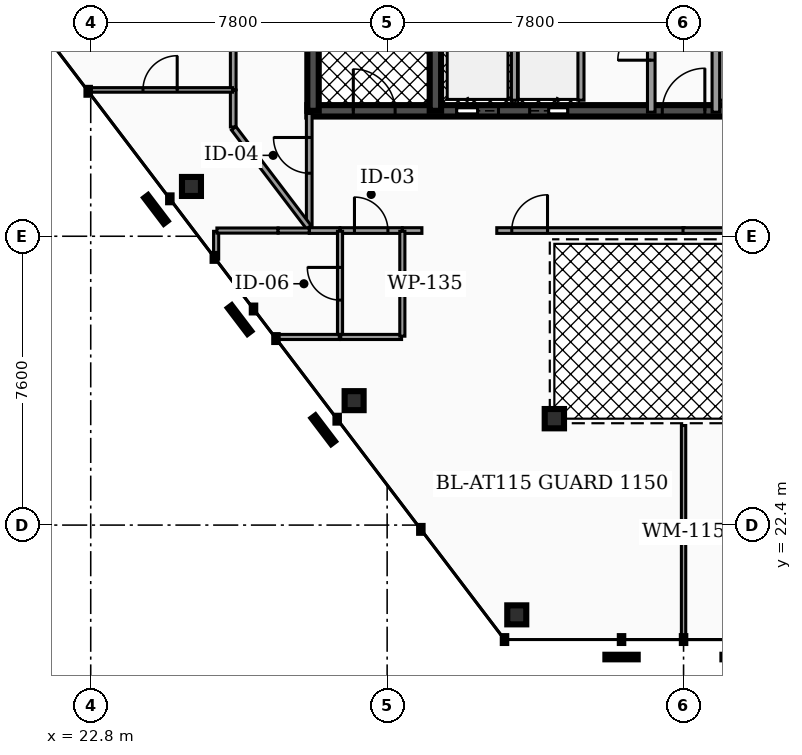
"""IFC4 building model, lengths in metres.
Left out: names, types, materials, properties, quantities, classifications, styles, units other than length and angle.
Written with IfcOpenShell. Run it as: python <this file> out.ifc"""

import sys

from ifc_helpers import new_model, si_unit, direction, frame, frame_2d, origin, origin_2d, place, context, subcontext, project, spatial, rectangle, hollow_rectangle, hollow_circle, extrude, element, fill, save


model = new_model("IFC4")
c1 = context("Model", 3, precision=1e-05, world=origin(), true_north=direction((0.0, 1.0)))
c2 = subcontext(c1, "Body", "Model", "MODEL_VIEW")
j1 = project(units=[si_unit("LENGTHUNIT", "METRE"), si_unit("PLANEANGLEUNIT", "RADIAN")], contexts=[c1])
p1 = place(None, origin())
s1 = spatial("IfcSite", under=j1, at=p1, CompositionType="ELEMENT")
p2 = place(p1, origin())
s2 = spatial("IfcBuilding", under=s1, at=p2, CompositionType="ELEMENT")
p3 = place(p2, frame((0.0, 0.0, 275.4)))
s3 = spatial("IfcBuildingStorey", under=s2, at=p3, CompositionType="ELEMENT", Elevation=275.4)
p4 = place(p3, frame((28.5, 33.3, 0.0), z_axis=(0.0, 0.0, 1.0), x_axis=(1.0, 0.0, 0.0)))
e1 = element("IfcWall", 1, at=p4, inside=s3, PredefinedType="SHEAR", context=c2, shape_type="SweptSolid", body=[
    extrude(rectangle(XDim=19.86, YDim=0.3, at=frame_2d((9.93, 0.0))), origin(), (0.0, 0.0, 1.0), 3.18),
])
p5 = place(p4, frame((3.93, 0.0, 0.0)))
e2 = element("IfcOpeningElement", 2, at=p5, cuts=e1, PredefinedType="OPENING", context=c2, shape_type="SweptSolid", body=[
    extrude(rectangle(XDim=1.1, YDim=2.15, at=frame_2d((0.55, 1.075))), frame((0.0, 0.16, 0.0), z_axis=(0.0, -1.0, 0.0), x_axis=(1.0, 0.0, 0.0)), (0.0, 0.0, 1.0), 0.32),
])
p6 = place(p4, frame((14.77, 0.0, 0.0)))
e3 = element("IfcOpeningElement", 3, at=p6, cuts=e1, PredefinedType="OPENING", context=c2, shape_type="SweptSolid", body=[
    extrude(rectangle(XDim=1.1, YDim=2.15, at=frame_2d((0.55, 1.075))), frame((0.0, 0.16, 0.0), z_axis=(0.0, -1.0, 0.0), x_axis=(1.0, 0.0, 0.0)), (0.0, 0.0, 1.0), 0.32),
])
p7 = place(p4, frame((11.25, 0.0, 0.0)))
e4 = element("IfcOpeningElement", 4, at=p7, cuts=e1, PredefinedType="OPENING", context=c2, shape_type="SweptSolid", body=[
    extrude(rectangle(XDim=1.0, YDim=2.1, at=frame_2d((0.5, 1.05))), frame((0.0, 0.16, 0.0), z_axis=(0.0, -1.0, 0.0), x_axis=(1.0, 0.0, 0.0)), (0.0, 0.0, 1.0), 0.32),
])
p8 = place(p4, frame((12.95, 0.0, 0.0)))
e5 = element("IfcOpeningElement", 5, at=p8, cuts=e1, PredefinedType="OPENING", context=c2, shape_type="SweptSolid", body=[
    extrude(rectangle(XDim=1.0, YDim=2.1, at=frame_2d((0.5, 1.05))), frame((0.0, 0.16, 0.0), z_axis=(0.0, -1.0, 0.0), x_axis=(1.0, 0.0, 0.0)), (0.0, 0.0, 1.0), 0.32),
])
p9 = place(p4, frame((5.85, 0.0, 0.0)))
e6 = element("IfcOpeningElement", 6, at=p9, cuts=e1, PredefinedType="OPENING", context=c2, shape_type="SweptSolid", body=[
    extrude(rectangle(XDim=1.0, YDim=2.1, at=frame_2d((0.5, 1.05))), frame((0.0, 0.16, 0.0), z_axis=(0.0, -1.0, 0.0), x_axis=(1.0, 0.0, 0.0)), (0.0, 0.0, 1.0), 0.32),
])
p10 = place(p4, frame((1.21, 0.0, 0.0)))
e7 = element("IfcOpeningElement", 7, at=p10, cuts=e1, PredefinedType="OPENING", context=c2, shape_type="SweptSolid", body=[
    extrude(rectangle(XDim=1.1, YDim=2.2, at=frame_2d((0.55, 1.1))), frame((0.0, 0.16, 0.0), z_axis=(0.0, -1.0, 0.0), x_axis=(1.0, 0.0, 0.0)), (0.0, 0.0, 1.0), 0.32),
])
p11 = place(p4, frame((9.34, 0.0, 0.0)))
e8 = element("IfcOpeningElement", 8, at=p11, cuts=e1, PredefinedType="OPENING", context=c2, shape_type="SweptSolid", body=[
    extrude(rectangle(XDim=1.12, YDim=2.05, at=frame_2d((0.56, 1.025))), frame((0.0, 0.16, 0.0), z_axis=(0.0, -1.0, 0.0), x_axis=(1.0, 0.0, 0.0)), (0.0, 0.0, 1.0), 0.32),
])
p12 = place(p4, frame((17.55, 0.0, 0.0)))
e9 = element("IfcOpeningElement", 9, at=p12, cuts=e1, PredefinedType="OPENING", context=c2, shape_type="SweptSolid", body=[
    extrude(rectangle(XDim=1.1, YDim=2.2, at=frame_2d((0.55, 1.1))), frame((0.0, 0.16, 0.0), z_axis=(0.0, -1.0, 0.0), x_axis=(1.0, 0.0, 0.0)), (0.0, 0.0, 1.0), 0.32),
])
for number, where, z_axis, x_axis in (
    (10, (28.65, 33.3, 0.0), (0.0, 0.0, 1.0), (0.0, 1.0, 0.0)),
    (11, (31.87, 33.3, 0.0), (0.0, 0.0, 1.0), (0.0, 1.0, 0.0)),
):
    element("IfcWall", number, at=place(p3, frame(where, z_axis=z_axis, x_axis=x_axis)), inside=s3, PredefinedType="SHEAR", context=c2, shape_type="SweptSolid", body=[
        extrude(rectangle(XDim=10.1, YDim=0.3, at=frame_2d((5.05, 0.0))), origin(), (0.0, 0.0, 1.0), 3.18),
    ])
p13 = place(p3, frame((25.451, 31.31, 0.0), z_axis=(0.06991126496, 0.123712542777, 0.989852323224), x_axis=(-0.870602675334, 0.491986769845, 0.0)))
e12 = element("IfcColumn", 12, at=p13, inside=s3, PredefinedType="COLUMN", context=c2, shape_type="SweptSolid", body=[
    extrude(hollow_rectangle(XDim=0.5, YDim=0.5, WallThickness=0.025, at=origin_2d()), origin(), (0.0, 0.0, 1.0), 3.213),
])
p14 = place(p3, frame((29.731, 25.674, 0.0), z_axis=(0.069335984522, 0.128875318438, 0.989233882127), x_axis=(-0.880637676987, 0.47379033535, 0.0)))
e13 = element("IfcColumn", 13, at=p14, inside=s3, PredefinedType="COLUMN", context=c2, shape_type="SweptSolid", body=[
    extrude(hollow_rectangle(XDim=0.5, YDim=0.5, WallThickness=0.025, at=origin_2d()), origin(), (0.0, 0.0, 1.0), 3.215),
])
p15 = place(p3, frame((34.011, 20.038, 0.0), z_axis=(0.068684707396, 0.133954153098, 0.988604418277), x_axis=(-0.889843706044, 0.456265469671, 0.0)))
e14 = element("IfcColumn", 14, at=p15, inside=s3, PredefinedType="COLUMN", context=c2, shape_type="SweptSolid", body=[
    extrude(hollow_rectangle(XDim=0.5, YDim=0.5, WallThickness=0.025, at=origin_2d()), origin(), (0.0, 0.0, 1.0), 3.217),
])
p16 = place(p3, frame((35.0, 25.2, 0.0), z_axis=(0.0, 0.0, 1.0), x_axis=(1.0, 0.0, 0.0)))
e15 = element("IfcColumn", 15, at=p16, inside=s3, PredefinedType="COLUMN", context=c2, shape_type="SweptSolid", body=[
    extrude(hollow_circle(Radius=0.254, WallThickness=0.02, at=origin_2d()), origin(), (0.0, 0.0, 1.0), 3.18),
])
p17 = place(p3, frame((33.95, 33.58, 0.0), z_axis=(0.0, 0.0, 1.0), x_axis=(0.0, 1.0, 0.0)))
e16 = element("IfcWall", 16, at=p17, inside=s3, PredefinedType="SOLIDWALL", context=c2, shape_type="SweptSolid", body=[
    extrude(rectangle(XDim=2.45, YDim=0.16, at=frame_2d((1.225, 0.0))), origin(), (0.0, 0.0, 1.0), 3.18),
])
for number, where, z_axis, x_axis in (
    (17, (39.4, 33.58, 0.0), (0.0, 0.0, 1.0), (0.0, 1.0, 0.0)),
    (18, (35.7, 33.58, 0.0), (0.0, 0.0, 1.0), (0.0, 1.0, 0.0)),
):
    element("IfcWall", number, at=place(p3, frame(where, z_axis=z_axis, x_axis=x_axis)), inside=s3, PredefinedType="SOLIDWALL", context=c2, shape_type="SweptSolid", body=[
        extrude(rectangle(XDim=2.25, YDim=0.16, at=frame_2d((1.125, 0.0))), origin(), (0.0, 0.0, 1.0), 3.18),
    ])
p18 = place(p3, frame((37.55, 33.265, 0.0), z_axis=(0.0, 0.0, 1.0), x_axis=(0.0, 1.0, 0.0)))
e19 = element("IfcWall", 19, at=p18, inside=s3, PredefinedType="PARTITIONING", context=c2, shape_type="SweptSolid", body=[
    extrude(rectangle(XDim=3.615, YDim=0.2, at=frame_2d((1.808, 0.0))), origin(), (0.0, 0.0, 1.0), 2.235),
])
p19 = place(p18, frame((1.367, 0.0, 0.0)))
e20 = element("IfcOpeningElement", 20, at=p19, cuts=e19, PredefinedType="OPENING", context=c2, shape_type="SweptSolid", body=[
    extrude(rectangle(XDim=0.88, YDim=2.05, at=frame_2d((0.44, 1.025))), frame((0.0, 0.11, 0.0), z_axis=(0.0, -1.0, 0.0), x_axis=(1.0, 0.0, 0.0)), (0.0, 0.0, 1.0), 0.22),
])
p20 = place(p3, frame((39.25, 33.265, 0.0), z_axis=(0.0, 0.0, 1.0), x_axis=(0.0, 1.0, 0.0)))
e21 = element("IfcWall", 21, at=p20, inside=s3, PredefinedType="PARTITIONING", context=c2, shape_type="SweptSolid", body=[
    extrude(rectangle(XDim=3.615, YDim=0.2, at=frame_2d((1.808, 0.0))), origin(), (0.0, 0.0, 1.0), 2.235),
])
p21 = place(p3, frame((28.55, 30.227, 0.0), z_axis=(0.0, 0.0, 1.0), x_axis=(0.0, 1.0, 0.0)))
e22 = element("IfcWall", 22, at=p21, inside=s3, PredefinedType="PARTITIONING", context=c2, shape_type="SweptSolid", body=[
    extrude(rectangle(XDim=3.003, YDim=0.15, at=frame_2d((1.501, 0.0))), origin(), (0.0, 0.0, 1.0), 2.235),
])
p22 = place(p21, frame((1.431, 0.0, 0.0)))
e23 = element("IfcOpeningElement", 23, at=p22, cuts=e22, PredefinedType="OPENING", context=c2, shape_type="SweptSolid", body=[
    extrude(rectangle(XDim=0.94, YDim=2.05, at=frame_2d((0.47, 1.025))), frame((0.0, 0.085, 0.0), z_axis=(0.0, -1.0, 0.0), x_axis=(1.0, 0.0, 0.0)), (0.0, 0.0, 1.0), 0.17),
])
p23 = place(p3, frame((29.365, 30.15, 0.0), z_axis=(0.0, 0.0, 1.0), x_axis=(1.0, 0.0, 0.0)))
e24 = element("IfcWall", 24, at=p23, inside=s3, PredefinedType="PARTITIONING", context=c2, shape_type="SweptSolid", body=[
    extrude(rectangle(XDim=1.63, YDim=0.15, at=frame_2d((0.815, 0.0))), origin(), (0.0, 0.0, 1.0), 2.235),
])
p24 = place(p23, frame((0.375, 0.0, 0.0)))
e25 = element("IfcOpeningElement", 25, at=p24, cuts=e24, PredefinedType="OPENING", context=c2, shape_type="SweptSolid", body=[
    extrude(rectangle(XDim=0.88, YDim=2.05, at=frame_2d((0.44, 1.025))), frame((0.0, 0.085, 0.0), z_axis=(0.0, -1.0, 0.0), x_axis=(1.0, 0.0, 0.0)), (0.0, 0.0, 1.0), 0.17),
])
p25 = place(p3, frame((28.55, 30.15, 0.0), z_axis=(0.0, 0.0, 1.0), x_axis=(1.0, 0.0, 0.0)))
e26 = element("IfcWall", 26, at=p25, inside=s3, PredefinedType="PARTITIONING", context=c2, shape_type="SweptSolid", body=[
    extrude(rectangle(XDim=0.805, YDim=0.15, at=frame_2d((0.402, 0.0))), origin(), (0.0, 0.0, 1.0), 2.235),
])
p26 = place(p3, frame((33.485, 30.15, 0.0), z_axis=(0.0, 0.0, 1.0), x_axis=(1.0, 0.0, 0.0)))
e27 = element("IfcWall", 27, at=p26, inside=s3, PredefinedType="PARTITIONING", context=c2, shape_type="SweptSolid", body=[
    extrude(rectangle(XDim=4.93, YDim=0.15, at=frame_2d((2.465, 0.0))), origin(), (0.0, 0.0, 1.0), 2.235),
])
p27 = place(p26, frame((0.395, 0.0, 0.0)))
e28 = element("IfcOpeningElement", 28, at=p27, cuts=e27, PredefinedType="OPENING", context=c2, shape_type="SweptSolid", body=[
    extrude(rectangle(XDim=0.94, YDim=2.05, at=frame_2d((0.47, 1.025))), frame((0.0, 0.085, 0.0), z_axis=(0.0, -1.0, 0.0), x_axis=(1.0, 0.0, 0.0)), (0.0, 0.0, 1.0), 0.17),
])
p28 = place(p3, frame((31.005, 30.15, 0.0), z_axis=(0.0, 0.0, 1.0), x_axis=(1.0, 0.0, 0.0)))
e29 = element("IfcWall", 29, at=p28, inside=s3, PredefinedType="PARTITIONING", context=c2, shape_type="SweptSolid", body=[
    extrude(rectangle(XDim=0.51, YDim=0.15, at=frame_2d((0.255, 0.0))), origin(), (0.0, 0.0, 1.0), 2.235),
])
p29 = place(p3, frame((38.385, 30.15, 0.0), z_axis=(0.0, 0.0, 1.0), x_axis=(1.0, 0.0, 0.0)))
e30 = element("IfcWall", 30, at=p29, inside=s3, PredefinedType="PARTITIONING", context=c2, shape_type="SweptSolid", body=[
    extrude(rectangle(XDim=4.93, YDim=0.15, at=frame_2d((2.465, 0.0))), origin(), (0.0, 0.0, 1.0), 2.235),
])
p30 = place(p29, frame((3.595, 0.0, 0.0)))
e31 = element("IfcOpeningElement", 31, at=p30, cuts=e30, PredefinedType="OPENING", context=c2, shape_type="SweptSolid", body=[
    extrude(rectangle(XDim=0.94, YDim=2.05, at=frame_2d((0.47, 1.025))), frame((0.0, 0.085, 0.0), z_axis=(0.0, -1.0, 0.0), x_axis=(1.0, 0.0, 0.0)), (0.0, 0.0, 1.0), 0.17),
])
p31 = place(p3, frame((26.55, 33.855, 0.0), z_axis=(0.0, 0.0, 1.0), x_axis=(0.0, 1.0, 0.0)))
e32 = element("IfcWall", 32, at=p31, inside=s3, PredefinedType="PARTITIONING", context=c2, shape_type="SweptSolid", body=[
    extrude(rectangle(XDim=9.695, YDim=0.15, at=frame_2d((4.847, 0.0))), origin(), (0.0, 0.0, 1.0), 2.235),
])
p32 = place(p31, frame((4.377, 0.0, 0.0)))
e33 = element("IfcOpeningElement", 33, at=p32, cuts=e32, PredefinedType="OPENING", context=c2, shape_type="SweptSolid", body=[
    extrude(rectangle(XDim=0.94, YDim=2.05, at=frame_2d((0.47, 1.025))), frame((0.0, 0.085, 0.0), z_axis=(0.0, -1.0, 0.0), x_axis=(1.0, 0.0, 0.0)), (0.0, 0.0, 1.0), 0.17),
])
p33 = place(p3, frame((26.562, 32.84, 0.0), z_axis=(0.0, 0.0, 1.0), x_axis=(0.604783852999, -0.796389660375, 0.0)))
e34 = element("IfcWall", 34, at=p33, inside=s3, PredefinedType="PARTITIONING", context=c2, shape_type="SweptSolid", body=[
    extrude(rectangle(XDim=3.267, YDim=0.15, at=frame_2d((1.634, 0.0))), origin(), (0.0, 0.0, 1.0), 2.235),
])
p34 = place(p3, frame((26.55, 32.875, 0.0), z_axis=(0.0, 0.0, 1.0), x_axis=(0.0, 1.0, 0.0)))
e35 = element("IfcWall", 35, at=p34, inside=s3, PredefinedType="PARTITIONING", context=c2, shape_type="SweptSolid", body=[
    extrude(rectangle(XDim=0.97, YDim=0.15, at=frame_2d((0.485, 0.0))), origin(), (0.0, 0.0, 1.0), 2.235),
])
p35 = place(p3, frame((29.36, 27.37, 0.0), z_axis=(0.0, 0.0, 1.0), x_axis=(0.0, 1.0, 0.0)))
e36 = element("IfcWall", 36, at=p35, inside=s3, PredefinedType="PARTITIONING", context=c2, shape_type="SweptSolid", body=[
    extrude(rectangle(XDim=2.76, YDim=0.135, at=frame_2d((1.38, 0.0))), origin(), (0.0, 0.0, 1.0), 2.235),
])
p36 = place(p35, frame((0.95, 0.0, 0.0)))
e37 = element("IfcOpeningElement", 37, at=p36, cuts=e36, PredefinedType="OPENING", context=c2, shape_type="SweptSolid", body=[
    extrude(rectangle(XDim=0.86, YDim=2.05, at=frame_2d((0.43, 1.025))), frame((0.0, 0.077, 0.0), z_axis=(0.0, -1.0, 0.0), x_axis=(1.0, 0.0, 0.0)), (0.0, 0.0, 1.0), 0.155),
])
p37 = place(p3, frame((29.38, 27.35, 0.0), z_axis=(0.0, 0.0, 1.0), x_axis=(1.0, 0.0, 0.0)))
e38 = element("IfcWall", 38, at=p37, inside=s3, PredefinedType="PARTITIONING", context=c2, shape_type="SweptSolid", body=[
    extrude(rectangle(XDim=1.6, YDim=0.135, at=frame_2d((0.8, 0.0))), origin(), (0.0, 0.0, 1.0), 2.235),
])
p38 = place(p3, frame((31.0, 27.37, 0.0), z_axis=(0.0, 0.0, 1.0), x_axis=(0.0, 1.0, 0.0)))
e39 = element("IfcWall", 39, at=p38, inside=s3, PredefinedType="PARTITIONING", context=c2, shape_type="SweptSolid", body=[
    extrude(rectangle(XDim=2.76, YDim=0.135, at=frame_2d((1.38, 0.0))), origin(), (0.0, 0.0, 1.0), 2.235),
])
p39 = place(p3, frame((27.657, 27.35, 0.0), z_axis=(0.0, 0.0, 1.0), x_axis=(1.0, 0.0, 0.0)))
e40 = element("IfcWall", 40, at=p39, inside=s3, PredefinedType="PARTITIONING", context=c2, shape_type="SweptSolid", body=[
    extrude(rectangle(XDim=1.683, YDim=0.135, at=frame_2d((0.842, 0.0))), origin(), (0.0, 0.0, 1.0), 2.235),
])
p40 = place(p3, frame((26.1, 29.396, 0.0), z_axis=(0.0, 0.0, 1.0), x_axis=(0.0, 1.0, 0.0)))
e41 = element("IfcWall", 41, at=p40, inside=s3, PredefinedType="PARTITIONING", context=c2, shape_type="SweptSolid", body=[
    extrude(rectangle(XDim=0.734, YDim=0.135, at=frame_2d((0.367, 0.0))), origin(), (0.0, 0.0, 1.0), 2.235),
])
p41 = place(p3, frame((26.12, 30.15, 0.0), z_axis=(0.0, 0.0, 1.0), x_axis=(1.0, 0.0, 0.0)))
e42 = element("IfcWall", 42, at=p41, inside=s3, PredefinedType="PARTITIONING", context=c2, shape_type="SweptSolid", body=[
    extrude(rectangle(XDim=1.61, YDim=0.135, at=frame_2d((0.805, 0.0))), origin(), (0.0, 0.0, 1.0), 2.235),
])
p42 = place(p3, frame((27.73, 30.15, 0.0), z_axis=(0.0, 0.0, 1.0), x_axis=(1.0, 0.0, 0.0)))
e43 = element("IfcWall", 43, at=p42, inside=s3, PredefinedType="PARTITIONING", context=c2, shape_type="SweptSolid", body=[
    extrude(rectangle(XDim=0.82, YDim=0.135, at=frame_2d((0.41, 0.0))), origin(), (0.0, 0.0, 1.0), 2.235),
])
p43 = place(p3, frame((38.4, 19.403, 0.0), z_axis=(0.0, 0.0, 1.0), x_axis=(0.0, 1.0, 0.0)))
e44 = element("IfcWall", 44, at=p43, inside=s3, PredefinedType="MOVABLE", context=c2, shape_type="SweptSolid", body=[
    extrude(rectangle(XDim=5.617, YDim=0.115, at=frame_2d((2.809, 0.0))), origin(), (0.0, 0.0, 1.0), 2.235),
])
p44 = place(p3, frame((22.721, 33.85, 0.0), z_axis=(0.0, 0.0, 1.0), x_axis=(1.0, 0.0, 0.0)))
e45 = element("IfcWall", 45, at=p44, inside=s3, PredefinedType="PARTITIONING", context=c2, shape_type="SweptSolid", body=[
    extrude(rectangle(XDim=3.809, YDim=0.12, at=frame_2d((1.905, 0.0))), origin(), (0.0, 0.0, 1.0), 2.235),
])
p45 = place(p44, frame((1.455, 0.0, 0.0)))
e46 = element("IfcOpeningElement", 46, at=p45, cuts=e45, PredefinedType="OPENING", context=c2, shape_type="SweptSolid", body=[
    extrude(rectangle(XDim=0.9, YDim=2.05, at=frame_2d((0.45, 1.025))), frame((0.0, 0.07, 0.0), z_axis=(0.0, -1.0, 0.0), x_axis=(1.0, 0.0, 0.0)), (0.0, 0.0, 1.0), 0.14),
])
p46 = place(p5, origin())
e47 = element("IfcDoor", 47, at=p46, inside=s3, OperationType="SLIDING_TO_LEFT", PredefinedType="DOOR", context=c2, shape_type="SweptSolid", body=[
    extrude(rectangle(XDim=1.1, YDim=2.15, at=frame_2d((0.55, 1.075))), frame((0.0, 0.025, 0.0), z_axis=(0.0, -1.0, 0.0), x_axis=(1.0, 0.0, 0.0)), (0.0, 0.0, 1.0), 0.05),
])
fill(e2, e47)
p47 = place(p9, origin())
e48 = element("IfcDoor", 48, at=p47, inside=s3, OperationType="SLIDING_TO_RIGHT", PredefinedType="DOOR", context=c2, shape_type="SweptSolid", body=[
    extrude(rectangle(XDim=1.0, YDim=2.1, at=frame_2d((0.5, 1.05))), frame((0.0, 0.025, 0.0), z_axis=(0.0, -1.0, 0.0), x_axis=(1.0, 0.0, 0.0)), (0.0, 0.0, 1.0), 0.05),
])
fill(e6, e48)
p48 = place(p10, origin())
e49 = element("IfcDoor", 49, at=p48, inside=s3, OperationType="SINGLE_SWING_LEFT", PredefinedType="DOOR", context=c2, shape_type="SweptSolid", body=[
    extrude(rectangle(XDim=1.1, YDim=2.2, at=frame_2d((0.55, 1.1))), frame((0.0, 0.025, 0.0), z_axis=(0.0, -1.0, 0.0), x_axis=(1.0, 0.0, 0.0)), (0.0, 0.0, 1.0), 0.05),
])
fill(e7, e49)
p49 = place(p11, origin())
e50 = element("IfcDoor", 50, at=p49, inside=s3, OperationType="SINGLE_SWING_RIGHT", PredefinedType="DOOR", context=c2, shape_type="SweptSolid", body=[
    extrude(rectangle(XDim=1.12, YDim=2.05, at=frame_2d((0.56, 1.025))), frame((0.0, 0.025, 0.0), z_axis=(0.0, -1.0, 0.0), x_axis=(1.0, 0.0, 0.0)), (0.0, 0.0, 1.0), 0.05),
])
fill(e8, e50)
p50 = place(p19, origin())
e51 = element("IfcDoor", 51, at=p50, inside=s3, OperationType="SINGLE_SWING_LEFT", PredefinedType="DOOR", context=c2, shape_type="SweptSolid", body=[
    extrude(rectangle(XDim=0.88, YDim=2.05, at=frame_2d((0.44, 1.025))), frame((0.0, 0.025, 0.0), z_axis=(0.0, -1.0, 0.0), x_axis=(1.0, 0.0, 0.0)), (0.0, 0.0, 1.0), 0.05),
])
fill(e20, e51)
p51 = place(p22, origin())
e52 = element("IfcDoor", 52, at=p51, inside=s3, OperationType="SINGLE_SWING_RIGHT", PredefinedType="DOOR", context=c2, shape_type="SweptSolid", body=[
    extrude(rectangle(XDim=0.94, YDim=2.05, at=frame_2d((0.47, 1.025))), frame((0.0, 0.025, 0.0), z_axis=(0.0, -1.0, 0.0), x_axis=(1.0, 0.0, 0.0)), (0.0, 0.0, 1.0), 0.05),
])
fill(e23, e52)
p52 = place(p24, origin())
e53 = element("IfcDoor", 53, at=p52, inside=s3, OperationType="SINGLE_SWING_LEFT", PredefinedType="DOOR", context=c2, shape_type="SweptSolid", body=[
    extrude(rectangle(XDim=0.88, YDim=2.05, at=frame_2d((0.44, 1.025))), frame((0.0, 0.025, 0.0), z_axis=(0.0, -1.0, 0.0), x_axis=(1.0, 0.0, 0.0)), (0.0, 0.0, 1.0), 0.05),
])
fill(e25, e53)
p53 = place(p27, origin())
e54 = element("IfcDoor", 54, at=p53, inside=s3, OperationType="SINGLE_SWING_RIGHT", PredefinedType="DOOR", context=c2, shape_type="SweptSolid", body=[
    extrude(rectangle(XDim=0.94, YDim=2.05, at=frame_2d((0.47, 1.025))), frame((0.0, 0.025, 0.0), z_axis=(0.0, -1.0, 0.0), x_axis=(1.0, 0.0, 0.0)), (0.0, 0.0, 1.0), 0.05),
])
fill(e28, e54)
p54 = place(p36, origin())
e55 = element("IfcDoor", 55, at=p54, inside=s3, OperationType="SINGLE_SWING_RIGHT", PredefinedType="DOOR", context=c2, shape_type="SweptSolid", body=[
    extrude(rectangle(XDim=0.86, YDim=2.05, at=frame_2d((0.43, 1.025))), frame((0.0, 0.025, 0.0), z_axis=(0.0, -1.0, 0.0), x_axis=(1.0, 0.0, 0.0)), (0.0, 0.0, 1.0), 0.05),
])
fill(e37, e55)
p55 = place(p45, origin())
e56 = element("IfcDoor", 56, at=p55, inside=s3, OperationType="SINGLE_SWING_RIGHT", PredefinedType="DOOR", context=c2, shape_type="SweptSolid", body=[
    extrude(rectangle(XDim=0.9, YDim=2.05, at=frame_2d((0.45, 1.025))), frame((0.0, 0.025, 0.0), z_axis=(0.0, -1.0, 0.0), x_axis=(1.0, 0.0, 0.0)), (0.0, 0.0, 1.0), 0.05),
])
fill(e46, e56)
save(model, sys.argv[1])
